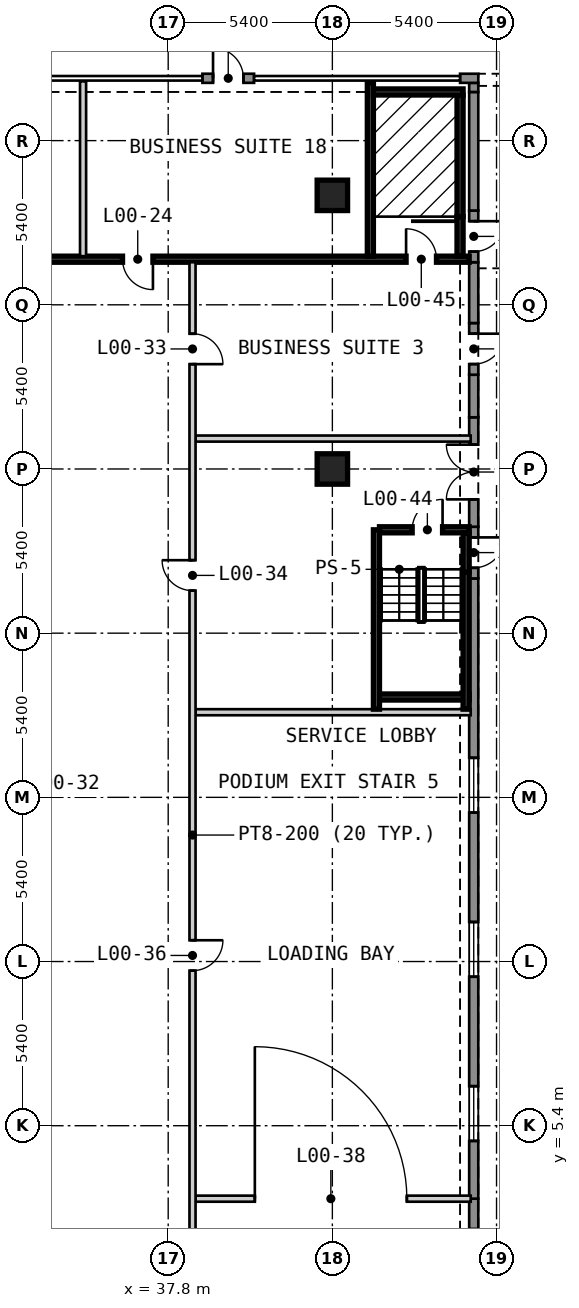
"""IFC4 building model, lengths in metres.
Left out: names, types, materials, properties, quantities, classifications, styles, units other than length and angle.
Written with IfcOpenShell. Run it as: python <this file> out.ifc"""

import sys

from ifc_helpers import new_model, si_unit, direction, frame, frame_2d, origin, origin_2d, place, context, subcontext, project, spatial, rectangle, extrude, element, fill, save


model = new_model("IFC4")
c1 = context("Model", 3, precision=1e-05, world=origin(), true_north=direction((0.0, 1.0)))
c2 = subcontext(c1, "Body", "Model", "MODEL_VIEW")
j1 = project(units=[si_unit("LENGTHUNIT", "METRE"), si_unit("PLANEANGLEUNIT", "RADIAN")], contexts=[c1])
p1 = place(None, origin())
s1 = spatial("IfcSite", under=j1, at=p1, CompositionType="ELEMENT")
p2 = place(p1, origin())
s2 = spatial("IfcBuilding", under=s1, at=p2, CompositionType="ELEMENT")
p3 = place(p2, origin())
s3 = spatial("IfcBuildingStorey", under=s2, at=p3, CompositionType="ELEMENT", Elevation=0.0)
for number, where, z_axis, x_axis in (
    (1, (43.2, 27.0, 0.0), (0.0, 0.0, 1.0), (1.0, 0.0, 0.0)),
    (2, (43.2, 36.0, 0.0), (0.0, 0.0, 1.0), (1.0, 0.0, 0.0)),
):
    element("IfcColumn", number, at=place(p3, frame(where, z_axis=z_axis, x_axis=x_axis)), inside=s3, PredefinedType="COLUMN", context=c2, shape_type="SweptSolid", body=[
        extrude(rectangle(XDim=1.0, YDim=1.0, at=origin_2d()), origin(), (0.0, 0.0, 1.0), 5.0),
    ])
p4 = place(p3, frame((47.85, -5.0, 0.0), z_axis=(0.0, 0.0, 1.0), x_axis=(0.0, 1.0, 0.0)))
e3 = element("IfcWall", 3, at=p4, inside=s3, PredefinedType="SOLIDWALL", context=c2, shape_type="SweptSolid", body=[
    extrude(rectangle(XDim=8.0, YDim=0.3, at=frame_2d((4.0, 0.0))), origin(), (0.0, 0.0, 1.0), 4.55),
])
p5 = place(p4, frame((1.0, 0.0, 0.0)))
e4 = element("IfcOpeningElement", 4, at=p5, cuts=e3, PredefinedType="OPENING", context=c2, shape_type="SweptSolid", body=[
    extrude(rectangle(XDim=6.0, YDim=4.2, at=frame_2d((3.0, 2.1))), frame((0.0, 0.16, 0.0), z_axis=(0.0, -1.0, 0.0), x_axis=(1.0, 0.0, 0.0)), (0.0, 0.0, 1.0), 0.32),
])
p6 = place(p3, frame((47.85, 3.0, 0.0), z_axis=(0.0, 0.0, 1.0), x_axis=(0.0, 1.0, 0.0)))
e5 = element("IfcWall", 5, at=p6, inside=s3, PredefinedType="SOLIDWALL", context=c2, shape_type="SweptSolid", body=[
    extrude(rectangle(XDim=20.4, YDim=0.3, at=frame_2d((10.2, 0.0))), origin(), (0.0, 0.0, 1.0), 4.55),
])
p7 = place(p6, frame((1.9, 0.0, 0.9)))
e6 = element("IfcOpeningElement", 6, at=p7, cuts=e5, PredefinedType="OPENING", context=c2, shape_type="SweptSolid", body=[
    extrude(rectangle(XDim=1.8, YDim=2.4, at=frame_2d((0.9, 1.2))), frame((0.0, 0.16, 0.0), z_axis=(0.0, -1.0, 0.0), x_axis=(1.0, 0.0, 0.0)), (0.0, 0.0, 1.0), 0.32),
])
p8 = place(p6, frame((7.3, 0.0, 0.9)))
e7 = element("IfcOpeningElement", 7, at=p8, cuts=e5, PredefinedType="OPENING", context=c2, shape_type="SweptSolid", body=[
    extrude(rectangle(XDim=1.8, YDim=2.4, at=frame_2d((0.9, 1.2))), frame((0.0, 0.16, 0.0), z_axis=(0.0, -1.0, 0.0), x_axis=(1.0, 0.0, 0.0)), (0.0, 0.0, 1.0), 0.32),
])
p9 = place(p6, frame((12.7, 0.0, 0.9)))
e8 = element("IfcOpeningElement", 8, at=p9, cuts=e5, PredefinedType="OPENING", context=c2, shape_type="SweptSolid", body=[
    extrude(rectangle(XDim=1.8, YDim=2.4, at=frame_2d((0.9, 1.2))), frame((0.0, 0.16, 0.0), z_axis=(0.0, -1.0, 0.0), x_axis=(1.0, 0.0, 0.0)), (0.0, 0.0, 1.0), 0.32),
])
p10 = place(p3, frame((47.85, 23.4, 0.0), z_axis=(0.0, 0.0, 1.0), x_axis=(0.0, 1.0, 0.0)))
e9 = element("IfcWall", 9, at=p10, inside=s3, PredefinedType="SOLIDWALL", context=c2, shape_type="SweptSolid", body=[
    extrude(rectangle(XDim=1.7, YDim=0.3, at=frame_2d((0.85, 0.0))), origin(), (0.0, 0.0, 1.0), 4.55),
])
p11 = place(p10, frame((1.35, 0.0, 0.0), z_axis=(0.0, 0.0, 1.0), x_axis=(-1.0, 0.0, 0.0)))
e10 = element("IfcOpeningElement", 10, at=p11, cuts=e9, PredefinedType="OPENING", context=c2, shape_type="SweptSolid", body=[
    extrude(rectangle(XDim=1.0, YDim=2.4, at=frame_2d((0.5, 1.2))), frame((0.0, 0.16, 0.0), z_axis=(0.0, -1.0, 0.0), x_axis=(1.0, 0.0, 0.0)), (0.0, 0.0, 1.0), 0.32),
])
p12 = place(p3, frame((47.85, 25.1, 0.0), z_axis=(0.0, 0.0, 1.0), x_axis=(0.0, 1.0, 0.0)))
e11 = element("IfcWall", 11, at=p12, inside=s3, PredefinedType="SOLIDWALL", context=c2, shape_type="SweptSolid", body=[
    extrude(rectangle(XDim=3.6, YDim=0.3, at=frame_2d((1.8, 0.0))), origin(), (0.0, 0.0, 1.0), 4.55),
])
p13 = place(p12, frame((0.9, 0.0, 0.0)))
e12 = element("IfcOpeningElement", 12, at=p13, cuts=e11, PredefinedType="OPENING", context=c2, shape_type="SweptSolid", body=[
    extrude(rectangle(XDim=1.8, YDim=2.4, at=frame_2d((0.9, 1.2))), frame((0.0, 0.16, 0.0), z_axis=(0.0, -1.0, 0.0), x_axis=(1.0, 0.0, 0.0)), (0.0, 0.0, 1.0), 0.32),
])
p14 = place(p3, frame((47.85, 28.7, 0.0), z_axis=(0.0, 0.0, 1.0), x_axis=(0.0, 1.0, 0.0)))
e13 = element("IfcWall", 13, at=p14, inside=s3, PredefinedType="SOLIDWALL", context=c2, shape_type="SweptSolid", body=[
    extrude(rectangle(XDim=1.4, YDim=0.3, at=frame_2d((0.7, 0.0))), origin(), (0.0, 0.0, 1.0), 4.55),
])
p15 = place(p3, frame((47.85, 30.1, 0.0), z_axis=(0.0, 0.0, 1.0), x_axis=(0.0, 1.0, 0.0)))
e14 = element("IfcWall", 14, at=p15, inside=s3, PredefinedType="SOLIDWALL", context=c2, shape_type="SweptSolid", body=[
    extrude(rectangle(XDim=1.7, YDim=0.3, at=frame_2d((0.85, 0.0))), origin(), (0.0, 0.0, 1.0), 4.55),
])
p16 = place(p15, frame((1.35, 0.0, 0.0), z_axis=(0.0, 0.0, 1.0), x_axis=(-1.0, 0.0, 0.0)))
e15 = element("IfcOpeningElement", 15, at=p16, cuts=e14, PredefinedType="OPENING", context=c2, shape_type="SweptSolid", body=[
    extrude(rectangle(XDim=1.0, YDim=2.4, at=frame_2d((0.5, 1.2))), frame((0.0, 0.16, 0.0), z_axis=(0.0, -1.0, 0.0), x_axis=(1.0, 0.0, 0.0)), (0.0, 0.0, 1.0), 0.32),
])
p17 = place(p3, frame((47.85, 31.8, 0.0), z_axis=(0.0, 0.0, 1.0), x_axis=(0.0, 1.0, 0.0)))
e16 = element("IfcWall", 16, at=p17, inside=s3, PredefinedType="SOLIDWALL", context=c2, shape_type="SweptSolid", body=[
    extrude(rectangle(XDim=2.0, YDim=0.3, at=frame_2d((1.0, 0.0))), origin(), (0.0, 0.0, 1.0), 4.55),
])
p18 = place(p3, frame((47.85, 33.8, 0.0), z_axis=(0.0, 0.0, 1.0), x_axis=(0.0, 1.0, 0.0)))
e17 = element("IfcWall", 17, at=p18, inside=s3, PredefinedType="SOLIDWALL", context=c2, shape_type="SweptSolid", body=[
    extrude(rectangle(XDim=1.7, YDim=0.3, at=frame_2d((0.85, 0.0))), origin(), (0.0, 0.0, 1.0), 4.55),
])
p19 = place(p18, frame((1.35, 0.0, 0.0), z_axis=(0.0, 0.0, 1.0), x_axis=(-1.0, 0.0, 0.0)))
e18 = element("IfcOpeningElement", 18, at=p19, cuts=e17, PredefinedType="OPENING", context=c2, shape_type="SweptSolid", body=[
    extrude(rectangle(XDim=1.0, YDim=2.4, at=frame_2d((0.5, 1.2))), frame((0.0, 0.16, 0.0), z_axis=(0.0, -1.0, 0.0), x_axis=(1.0, 0.0, 0.0)), (0.0, 0.0, 1.0), 0.32),
])
p20 = place(p3, frame((47.85, 35.5, 0.0), z_axis=(0.0, 0.0, 1.0), x_axis=(0.0, 1.0, 0.0)))
e19 = element("IfcWall", 19, at=p20, inside=s3, PredefinedType="SOLIDWALL", context=c2, shape_type="SweptSolid", body=[
    extrude(rectangle(XDim=3.9, YDim=0.3, at=frame_2d((1.95, 0.0))), origin(), (0.0, 0.0, 1.0), 4.55),
])
p21 = place(p3, frame((47.85, 39.4, 0.0), z_axis=(0.0, 0.0, 1.0), x_axis=(0.0, 1.0, 0.0)))
e20 = element("IfcWall", 20, at=p21, inside=s3, PredefinedType="SOLIDWALL", context=c2, shape_type="SweptSolid", body=[
    extrude(rectangle(XDim=0.3, YDim=0.3, at=frame_2d((0.15, 0.0))), origin(), (0.0, 0.0, 1.0), 4.55),
])
p22 = place(p3, frame((48.0, 39.85, 0.0), z_axis=(0.0, 0.0, 1.0), x_axis=(-1.0, 0.0, 0.0)))
e21 = element("IfcWall", 21, at=p22, inside=s3, PredefinedType="SOLIDWALL", context=c2, shape_type="SweptSolid", body=[
    extrude(rectangle(XDim=0.6, YDim=0.3, at=frame_2d((0.3, 0.0))), origin(), (0.0, 0.0, 1.0), 4.55),
])
p23 = place(p3, frame((40.625, 39.85, 0.0), z_axis=(0.0, 0.0, 1.0), x_axis=(-1.0, 0.0, 0.0)))
e22 = element("IfcWall", 22, at=p23, inside=s3, PredefinedType="SOLIDWALL", context=c2, shape_type="SweptSolid", body=[
    extrude(rectangle(XDim=1.7, YDim=0.3, at=frame_2d((0.85, 0.0))), origin(), (0.0, 0.0, 1.0), 4.55),
])
p24 = place(p23, frame((1.35, 0.0, 0.0), z_axis=(0.0, 0.0, 1.0), x_axis=(-1.0, 0.0, 0.0)))
e23 = element("IfcOpeningElement", 23, at=p24, cuts=e22, PredefinedType="OPENING", context=c2, shape_type="SweptSolid", body=[
    extrude(rectangle(XDim=1.0, YDim=2.4, at=frame_2d((0.5, 1.2))), frame((0.0, 0.16, 0.0), z_axis=(0.0, -1.0, 0.0), x_axis=(1.0, 0.0, 0.0)), (0.0, 0.0, 1.0), 0.32),
])
p25 = place(p3, frame((38.7, 3.0, 0.0), z_axis=(0.0, 0.0, 1.0), x_axis=(1.0, 0.0, 0.0)))
e24 = element("IfcWall", 24, at=p25, inside=s3, PredefinedType="PARTITIONING", context=c2, shape_type="SweptSolid", body=[
    extrude(rectangle(XDim=9.05, YDim=0.2, at=frame_2d((4.525, 0.0))), origin(), (0.0, 0.0, 1.0), 4.55),
])
p26 = place(p25, frame((1.95, 0.0, 0.0)))
e25 = element("IfcOpeningElement", 25, at=p26, cuts=e24, PredefinedType="OPENING", context=c2, shape_type="SweptSolid", body=[
    extrude(rectangle(XDim=5.0, YDim=2.1, at=frame_2d((2.5, 1.05))), frame((0.0, 0.11, 0.0), z_axis=(0.0, -1.0, 0.0), x_axis=(1.0, 0.0, 0.0)), (0.0, 0.0, 1.0), 0.22),
])
p27 = place(p3, frame((38.7, 19.0, 0.0), z_axis=(0.0, 0.0, 1.0), x_axis=(1.0, 0.0, 0.0)))
e26 = element("IfcWall", 26, at=p27, inside=s3, PredefinedType="PARTITIONING", context=c2, shape_type="SweptSolid", body=[
    extrude(rectangle(XDim=9.05, YDim=0.2, at=frame_2d((4.525, 0.0))), origin(), (0.0, 0.0, 1.0), 4.55),
])
p28 = place(p3, frame((44.65, 19.5, 0.0), z_axis=(0.0, 0.0, 1.0), x_axis=(1.0, 0.0, 0.0)))
e27 = element("IfcWall", 27, at=p28, inside=s3, PredefinedType="SOLIDWALL", context=c2, shape_type="SweptSolid", body=[
    extrude(rectangle(XDim=3.05, YDim=0.2, at=frame_2d((1.525, 0.0))), origin(), (0.0, 0.0, 1.0), 4.55),
])
p29 = place(p3, frame((44.75, 25.0, 0.0), z_axis=(0.0, 0.0, 1.0), x_axis=(1.0, 0.0, 0.0)))
e28 = element("IfcWall", 28, at=p29, inside=s3, PredefinedType="SOLIDWALL", context=c2, shape_type="SweptSolid", body=[
    extrude(rectangle(XDim=2.95, YDim=0.2, at=frame_2d((1.475, 0.0))), origin(), (0.0, 0.0, 1.0), 4.55),
])
p30 = place(p29, frame((2.075, 0.0, 0.0), z_axis=(0.0, 0.0, 1.0), x_axis=(-1.0, 0.0, 0.0)))
e29 = element("IfcOpeningElement", 29, at=p30, cuts=e28, PredefinedType="OPENING", context=c2, shape_type="SweptSolid", body=[
    extrude(rectangle(XDim=1.0, YDim=2.1, at=frame_2d((0.5, 1.05))), frame((0.0, 0.11, 0.0), z_axis=(0.0, -1.0, 0.0), x_axis=(1.0, 0.0, 0.0)), (0.0, 0.0, 1.0), 0.22),
])
p31 = place(p3, frame((38.7, 28.0, 0.0), z_axis=(0.0, 0.0, 1.0), x_axis=(1.0, 0.0, 0.0)))
e30 = element("IfcWall", 30, at=p31, inside=s3, PredefinedType="PARTITIONING", context=c2, shape_type="SweptSolid", body=[
    extrude(rectangle(XDim=9.05, YDim=0.2, at=frame_2d((4.525, 0.0))), origin(), (0.0, 0.0, 1.0), 4.55),
])
p32 = place(p3, frame((21.2, 33.9, 0.0), z_axis=(0.0, 0.0, 1.0), x_axis=(1.0, 0.0, 0.0)))
e31 = element("IfcWall", 31, at=p32, inside=s3, PredefinedType="SOLIDWALL", context=c2, shape_type="SweptSolid", body=[
    extrude(rectangle(XDim=26.5, YDim=0.2, at=frame_2d((13.25, 0.0))), origin(), (0.0, 0.0, 1.0), 4.55),
])
p33 = place(p32, frame((15.098, 0.0, 0.0)))
e32 = element("IfcOpeningElement", 32, at=p33, cuts=e31, PredefinedType="OPENING", context=c2, shape_type="SweptSolid", body=[
    extrude(rectangle(XDim=1.0, YDim=2.1, at=frame_2d((0.5, 1.05))), frame((0.0, 0.11, 0.0), z_axis=(0.0, -1.0, 0.0), x_axis=(1.0, 0.0, 0.0)), (0.0, 0.0, 1.0), 0.22),
])
p34 = place(p32, frame((6.621, 0.0, 0.0)))
e33 = element("IfcOpeningElement", 33, at=p34, cuts=e31, PredefinedType="OPENING", context=c2, shape_type="SweptSolid", body=[
    extrude(rectangle(XDim=1.0, YDim=2.1, at=frame_2d((0.5, 1.05))), frame((0.0, 0.11, 0.0), z_axis=(0.0, -1.0, 0.0), x_axis=(1.0, 0.0, 0.0)), (0.0, 0.0, 1.0), 0.22),
])
p35 = place(p32, frame((24.425, 0.0, 0.0)))
e34 = element("IfcOpeningElement", 34, at=p35, cuts=e31, PredefinedType="OPENING", context=c2, shape_type="SweptSolid", body=[
    extrude(rectangle(XDim=1.0, YDim=2.1, at=frame_2d((0.5, 1.05))), frame((0.0, 0.11, 0.0), z_axis=(0.0, -1.0, 0.0), x_axis=(1.0, 0.0, 0.0)), (0.0, 0.0, 1.0), 0.22),
])
p36 = place(p3, frame((35.0, 34.0, 0.0), z_axis=(0.0, 0.0, 1.0), x_axis=(0.0, 1.0, 0.0)))
e35 = element("IfcWall", 35, at=p36, inside=s3, PredefinedType="PARTITIONING", context=c2, shape_type="SweptSolid", body=[
    extrude(rectangle(XDim=5.75, YDim=0.2, at=frame_2d((2.875, 0.0))), origin(), (0.0, 0.0, 1.0), 4.55),
])
p37 = place(p3, frame((38.6, -3.88, 0.0), z_axis=(0.0, 0.0, 1.0), x_axis=(0.0, 1.0, 0.0)))
e36 = element("IfcWall", 36, at=p37, inside=s3, PredefinedType="PARTITIONING", context=c2, shape_type="SweptSolid", body=[
    extrude(rectangle(XDim=37.68, YDim=0.2, at=frame_2d((18.84, 0.0))), origin(), (0.0, 0.0, 1.0), 4.55),
])
p38 = place(p37, frame((35.328, 0.0, 0.0), z_axis=(0.0, 0.0, 1.0), x_axis=(-1.0, 0.0, 0.0)))
e37 = element("IfcOpeningElement", 37, at=p38, cuts=e36, PredefinedType="OPENING", context=c2, shape_type="SweptSolid", body=[
    extrude(rectangle(XDim=1.0, YDim=2.1, at=frame_2d((0.5, 1.05))), frame((0.0, 0.11, 0.0), z_axis=(0.0, -1.0, 0.0), x_axis=(1.0, 0.0, 0.0)), (0.0, 0.0, 1.0), 0.22),
])
p39 = place(p37, frame((27.88, 0.0, 0.0), z_axis=(0.0, 0.0, 1.0), x_axis=(-1.0, 0.0, 0.0)))
e38 = element("IfcOpeningElement", 38, at=p39, cuts=e36, PredefinedType="OPENING", context=c2, shape_type="SweptSolid", body=[
    extrude(rectangle(XDim=1.0, YDim=2.1, at=frame_2d((0.5, 1.05))), frame((0.0, 0.11, 0.0), z_axis=(0.0, -1.0, 0.0), x_axis=(1.0, 0.0, 0.0)), (0.0, 0.0, 1.0), 0.22),
])
p40 = place(p37, frame((14.38, 0.0, 0.0)))
e39 = element("IfcOpeningElement", 39, at=p40, cuts=e36, PredefinedType="OPENING", context=c2, shape_type="SweptSolid", body=[
    extrude(rectangle(XDim=1.0, YDim=2.1, at=frame_2d((0.5, 1.05))), frame((0.0, 0.11, 0.0), z_axis=(0.0, -1.0, 0.0), x_axis=(1.0, 0.0, 0.0)), (0.0, 0.0, 1.0), 0.22),
])
p41 = place(p37, frame((2.88, 0.0, 0.0)))
e40 = element("IfcOpeningElement", 40, at=p41, cuts=e36, PredefinedType="OPENING", context=c2, shape_type="SweptSolid", body=[
    extrude(rectangle(XDim=1.0, YDim=2.1, at=frame_2d((0.5, 1.05))), frame((0.0, 0.11, 0.0), z_axis=(0.0, -1.0, 0.0), x_axis=(1.0, 0.0, 0.0)), (0.0, 0.0, 1.0), 0.22),
])
p42 = place(p3, frame((44.45, 34.0, 0.0), z_axis=(0.0, 0.0, 1.0), x_axis=(0.0, 1.0, 0.0)))
e41 = element("IfcWall", 41, at=p42, inside=s3, PredefinedType="SOLIDWALL", context=c2, shape_type="SweptSolid", body=[
    extrude(rectangle(XDim=5.7, YDim=0.2, at=frame_2d((2.85, 0.0))), origin(), (0.0, 0.0, 1.0), 4.55),
])
p43 = place(p3, frame((44.65, 19.1, 0.0), z_axis=(0.0, 0.0, 1.0), x_axis=(0.0, 1.0, 0.0)))
e42 = element("IfcWall", 42, at=p43, inside=s3, PredefinedType="SOLIDWALL", context=c2, shape_type="SweptSolid", body=[
    extrude(rectangle(XDim=5.9, YDim=0.2, at=frame_2d((2.95, 0.0))), origin(), (0.0, 0.0, 1.0), 4.55),
])
p44 = place(p3, frame((47.4, 35.3, 0.0), z_axis=(0.0, 0.0, 1.0), x_axis=(0.0, 1.0, 0.0)))
e43 = element("IfcWall", 43, at=p44, inside=s3, PredefinedType="SOLIDWALL", context=c2, shape_type="SweptSolid", body=[
    extrude(rectangle(XDim=4.0, YDim=0.2, at=frame_2d((2.0, 0.0))), origin(), (0.0, 0.0, 1.0), 4.55),
])
p45 = place(p3, frame((47.4, 34.0, 2.3), z_axis=(0.0, 0.0, 1.0), x_axis=(0.0, 1.0, 0.0)))
e44 = element("IfcWall", 44, at=p45, inside=s3, PredefinedType="SOLIDWALL", context=c2, shape_type="SweptSolid", body=[
    extrude(rectangle(XDim=1.3, YDim=0.2, at=frame_2d((0.65, 0.0))), origin(), (0.0, 0.0, 1.0), 2.25),
])
p46 = place(p3, frame((44.55, 39.4, 0.0), z_axis=(0.0, 0.0, 1.0), x_axis=(1.0, 0.0, 0.0)))
e45 = element("IfcWall", 45, at=p46, inside=s3, PredefinedType="SOLIDWALL", context=c2, shape_type="SweptSolid", body=[
    extrude(rectangle(XDim=2.95, YDim=0.2, at=frame_2d((1.475, 0.0))), origin(), (0.0, 0.0, 1.0), 4.55),
])
p47 = place(p3, frame((47.6, 19.1, 0.0), z_axis=(0.0, 0.0, 1.0), x_axis=(0.0, 1.0, 0.0)))
e46 = element("IfcWall", 46, at=p47, inside=s3, PredefinedType="SOLIDWALL", context=c2, shape_type="SweptSolid", body=[
    extrude(rectangle(XDim=4.5, YDim=0.2, at=frame_2d((2.25, 0.0))), origin(), (0.0, 0.0, 1.0), 4.55),
])
p48 = place(p3, frame((47.6, 23.6, 2.3), z_axis=(0.0, 0.0, 1.0), x_axis=(0.0, 1.0, 0.0)))
e47 = element("IfcWall", 47, at=p48, inside=s3, PredefinedType="SOLIDWALL", context=c2, shape_type="SweptSolid", body=[
    extrude(rectangle(XDim=1.3, YDim=0.2, at=frame_2d((0.65, 0.0))), origin(), (0.0, 0.0, 1.0), 2.25),
])
p49 = place(p7, origin())
e48 = element("IfcWindow", 48, at=p49, inside=s3, PartitioningType="SINGLE_PANEL", PredefinedType="WINDOW", context=c2, shape_type="SweptSolid", body=[
    extrude(rectangle(XDim=1.8, YDim=2.4, at=frame_2d((0.9, 1.2))), frame((0.0, 0.03, 0.0), z_axis=(0.0, -1.0, 0.0), x_axis=(1.0, 0.0, 0.0)), (0.0, 0.0, 1.0), 0.06),
])
fill(e6, e48)
p50 = place(p8, origin())
e49 = element("IfcWindow", 49, at=p50, inside=s3, PartitioningType="SINGLE_PANEL", PredefinedType="WINDOW", context=c2, shape_type="SweptSolid", body=[
    extrude(rectangle(XDim=1.8, YDim=2.4, at=frame_2d((0.9, 1.2))), frame((0.0, 0.03, 0.0), z_axis=(0.0, -1.0, 0.0), x_axis=(1.0, 0.0, 0.0)), (0.0, 0.0, 1.0), 0.06),
])
fill(e7, e49)
p51 = place(p9, origin())
e50 = element("IfcWindow", 50, at=p51, inside=s3, PartitioningType="SINGLE_PANEL", PredefinedType="WINDOW", context=c2, shape_type="SweptSolid", body=[
    extrude(rectangle(XDim=1.8, YDim=2.4, at=frame_2d((0.9, 1.2))), frame((0.0, 0.03, 0.0), z_axis=(0.0, -1.0, 0.0), x_axis=(1.0, 0.0, 0.0)), (0.0, 0.0, 1.0), 0.06),
])
fill(e8, e50)
p52 = place(p11, origin())
e51 = element("IfcDoor", 51, at=p52, inside=s3, OperationType="SINGLE_SWING_RIGHT", PredefinedType="DOOR", context=c2, shape_type="SweptSolid", body=[
    extrude(rectangle(XDim=1.0, YDim=2.4, at=frame_2d((0.5, 1.2))), frame((0.0, 0.025, 0.0), z_axis=(0.0, -1.0, 0.0), x_axis=(1.0, 0.0, 0.0)), (0.0, 0.0, 1.0), 0.05),
])
fill(e10, e51)
p53 = place(p13, origin())
e52 = element("IfcDoor", 52, at=p53, inside=s3, OperationType="DOUBLE_DOOR_SINGLE_SWING", PredefinedType="DOOR", context=c2, shape_type="SweptSolid", body=[
    extrude(rectangle(XDim=1.8, YDim=2.4, at=frame_2d((0.9, 1.2))), frame((0.0, 0.025, 0.0), z_axis=(0.0, -1.0, 0.0), x_axis=(1.0, 0.0, 0.0)), (0.0, 0.0, 1.0), 0.05),
])
fill(e12, e52)
p54 = place(p16, origin())
e53 = element("IfcDoor", 53, at=p54, inside=s3, OperationType="SINGLE_SWING_RIGHT", PredefinedType="DOOR", context=c2, shape_type="SweptSolid", body=[
    extrude(rectangle(XDim=1.0, YDim=2.4, at=frame_2d((0.5, 1.2))), frame((0.0, 0.025, 0.0), z_axis=(0.0, -1.0, 0.0), x_axis=(1.0, 0.0, 0.0)), (0.0, 0.0, 1.0), 0.05),
])
fill(e15, e53)
p55 = place(p19, origin())
e54 = element("IfcDoor", 54, at=p55, inside=s3, OperationType="SINGLE_SWING_RIGHT", PredefinedType="DOOR", context=c2, shape_type="SweptSolid", body=[
    extrude(rectangle(XDim=1.0, YDim=2.4, at=frame_2d((0.5, 1.2))), frame((0.0, 0.025, 0.0), z_axis=(0.0, -1.0, 0.0), x_axis=(1.0, 0.0, 0.0)), (0.0, 0.0, 1.0), 0.05),
])
fill(e18, e54)
p56 = place(p24, origin())
e55 = element("IfcDoor", 55, at=p56, inside=s3, OperationType="SINGLE_SWING_RIGHT", PredefinedType="DOOR", context=c2, shape_type="SweptSolid", body=[
    extrude(rectangle(XDim=1.0, YDim=2.4, at=frame_2d((0.5, 1.2))), frame((0.0, 0.025, 0.0), z_axis=(0.0, -1.0, 0.0), x_axis=(1.0, 0.0, 0.0)), (0.0, 0.0, 1.0), 0.05),
])
fill(e23, e55)
p57 = place(p33, origin())
e56 = element("IfcDoor", 56, at=p57, inside=s3, OperationType="SINGLE_SWING_RIGHT", PredefinedType="DOOR", context=c2, shape_type="SweptSolid", body=[
    extrude(rectangle(XDim=1.0, YDim=2.1, at=frame_2d((0.5, 1.05))), frame((0.0, 0.025, 0.0), z_axis=(0.0, -1.0, 0.0), x_axis=(1.0, 0.0, 0.0)), (0.0, 0.0, 1.0), 0.05),
])
fill(e32, e56)
p58 = place(p38, origin())
e57 = element("IfcDoor", 57, at=p58, inside=s3, OperationType="SINGLE_SWING_RIGHT", PredefinedType="DOOR", context=c2, shape_type="SweptSolid", body=[
    extrude(rectangle(XDim=1.0, YDim=2.1, at=frame_2d((0.5, 1.05))), frame((0.0, 0.025, 0.0), z_axis=(0.0, -1.0, 0.0), x_axis=(1.0, 0.0, 0.0)), (0.0, 0.0, 1.0), 0.05),
])
fill(e37, e57)
p59 = place(p39, origin())
e58 = element("IfcDoor", 58, at=p59, inside=s3, OperationType="SINGLE_SWING_LEFT", PredefinedType="DOOR", context=c2, shape_type="SweptSolid", body=[
    extrude(rectangle(XDim=1.0, YDim=2.1, at=frame_2d((0.5, 1.05))), frame((0.0, 0.025, 0.0), z_axis=(0.0, -1.0, 0.0), x_axis=(1.0, 0.0, 0.0)), (0.0, 0.0, 1.0), 0.05),
])
fill(e38, e58)
p60 = place(p40, origin())
e59 = element("IfcDoor", 59, at=p60, inside=s3, OperationType="SINGLE_SWING_RIGHT", PredefinedType="DOOR", context=c2, shape_type="SweptSolid", body=[
    extrude(rectangle(XDim=1.0, YDim=2.1, at=frame_2d((0.5, 1.05))), frame((0.0, 0.025, 0.0), z_axis=(0.0, -1.0, 0.0), x_axis=(1.0, 0.0, 0.0)), (0.0, 0.0, 1.0), 0.05),
])
fill(e39, e59)
p61 = place(p26, origin())
e60 = element("IfcDoor", 60, at=p61, inside=s3, OperationType="ROLLINGUP", PredefinedType="DOOR", context=c2, shape_type="SweptSolid", body=[
    extrude(rectangle(XDim=5.0, YDim=2.1, at=frame_2d((2.5, 1.05))), frame((0.0, 0.025, 0.0), z_axis=(0.0, -1.0, 0.0), x_axis=(1.0, 0.0, 0.0)), (0.0, 0.0, 1.0), 0.05),
])
fill(e25, e60)
p62 = place(p30, origin())
e61 = element("IfcDoor", 61, at=p62, inside=s3, OperationType="SINGLE_SWING_LEFT", PredefinedType="DOOR", context=c2, shape_type="SweptSolid", body=[
    extrude(rectangle(XDim=1.0, YDim=2.1, at=frame_2d((0.5, 1.05))), frame((0.0, 0.025, 0.0), z_axis=(0.0, -1.0, 0.0), x_axis=(1.0, 0.0, 0.0)), (0.0, 0.0, 1.0), 0.05),
])
fill(e29, e61)
p63 = place(p35, origin())
e62 = element("IfcDoor", 62, at=p63, inside=s3, OperationType="SINGLE_SWING_LEFT", PredefinedType="DOOR", context=c2, shape_type="SweptSolid", body=[
    extrude(rectangle(XDim=1.0, YDim=2.1, at=frame_2d((0.5, 1.05))), frame((0.0, 0.025, 0.0), z_axis=(0.0, -1.0, 0.0), x_axis=(1.0, 0.0, 0.0)), (0.0, 0.0, 1.0), 0.05),
])
fill(e34, e62)
save(model, sys.argv[1])
